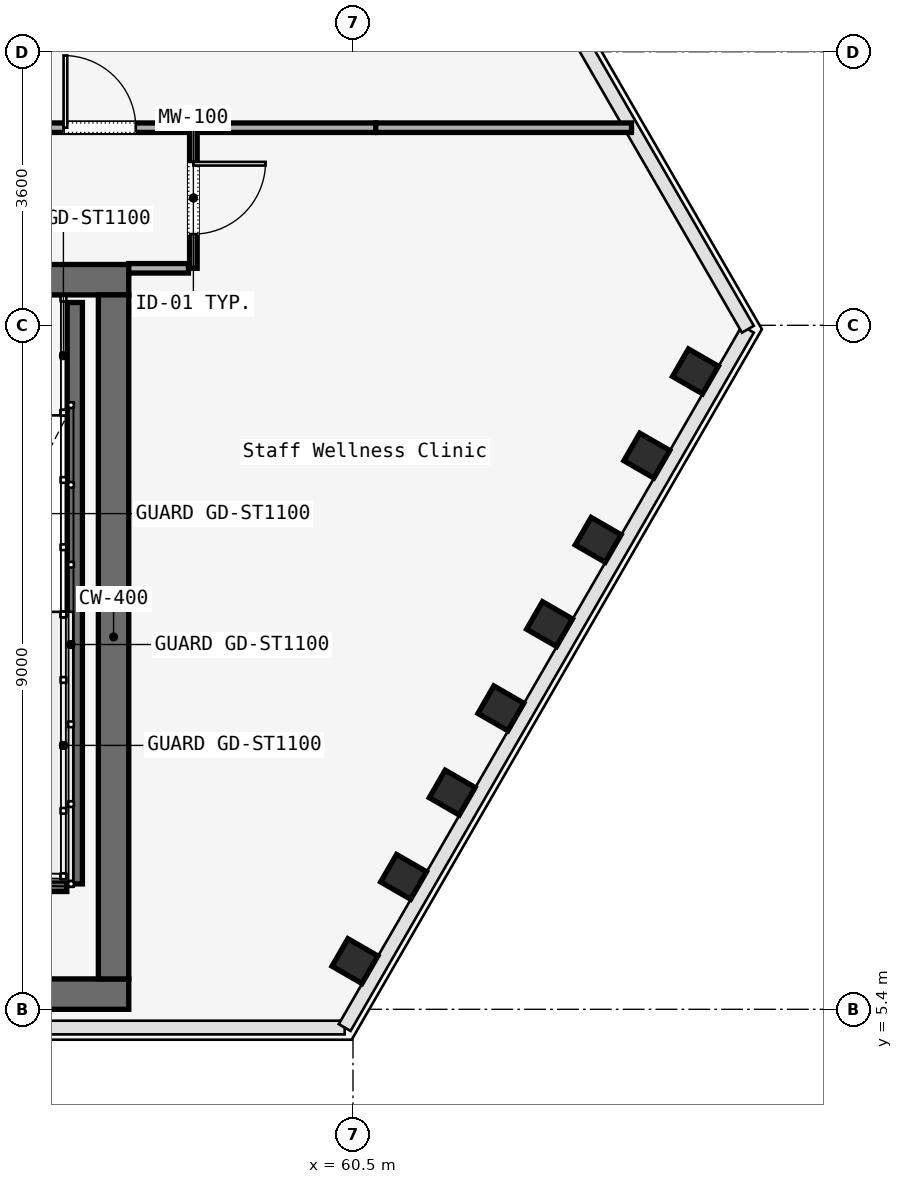
"""IFC4 building model, lengths in metres.
Left out: names, types, materials, properties, quantities, classifications, styles, units other than length and angle.
Written with IfcOpenShell. Run it as: python <this file> out.ifc"""

import sys

from ifc_helpers import new_model, si_unit, direction, frame, frame_2d, origin, origin_2d, place, context, subcontext, project, spatial, rectangle, i_section, extrude, element, fill, save


model = new_model("IFC4")
c1 = context("Model", 3, precision=1e-05, world=origin(), true_north=direction((0.0, 1.0)))
c2 = subcontext(c1, "Body", "Model", "MODEL_VIEW")
j1 = project(units=[si_unit("LENGTHUNIT", "METRE"), si_unit("PLANEANGLEUNIT", "RADIAN")], contexts=[c1])
p1 = place(None, origin())
s1 = spatial("IfcSite", under=j1, at=p1, CompositionType="ELEMENT")
p2 = place(p1, origin())
s2 = spatial("IfcBuilding", under=s1, at=p2, CompositionType="ELEMENT")
p3 = place(p2, frame((0.0, 0.0, 161.2)))
s3 = spatial("IfcBuildingStorey", under=s2, at=p3, CompositionType="ELEMENT", Elevation=161.2)
p4 = place(p3, frame((26.45, 15.0, 0.0), z_axis=(0.0, 0.0, 1.0), x_axis=(1.0, 0.0, 0.0)))
e1 = element("IfcWall", 1, at=p4, inside=s3, PredefinedType="SOLIDWALL", context=c2, shape_type="SweptSolid", body=[
    extrude(rectangle(XDim=31.1, YDim=0.4, at=frame_2d((15.55, 0.0))), origin(), (0.0, 0.0, 1.0), 3.58),
])
p5 = place(p4, frame((1.65, 0.0, 0.0)))
e2 = element("IfcOpeningElement", 2, at=p5, cuts=e1, PredefinedType="OPENING", context=c2, shape_type="SweptSolid", body=[
    extrude(rectangle(XDim=1.1, YDim=2.2, at=frame_2d((0.55, 1.1))), frame((0.0, 0.2, 0.0), z_axis=(0.0, -1.0, 0.0), x_axis=(1.0, 0.0, 0.0)), (0.0, 0.0, 1.0), 0.4),
])
p6 = place(p4, frame((13.65, 0.0, 0.0)))
e3 = element("IfcOpeningElement", 3, at=p6, cuts=e1, PredefinedType="OPENING", context=c2, shape_type="SweptSolid", body=[
    extrude(rectangle(XDim=1.1, YDim=2.2, at=frame_2d((0.55, 1.1))), frame((0.0, 0.2, 0.0), z_axis=(0.0, -1.0, 0.0), x_axis=(1.0, 0.0, 0.0)), (0.0, 0.0, 1.0), 0.4),
])
p7 = place(p4, frame((25.55, 0.0, 0.0)))
e4 = element("IfcOpeningElement", 4, at=p7, cuts=e1, PredefinedType="OPENING", context=c2, shape_type="SweptSolid", body=[
    extrude(rectangle(XDim=1.1, YDim=2.2, at=frame_2d((0.55, 1.1))), frame((0.0, 0.2, 0.0), z_axis=(0.0, -1.0, 0.0), x_axis=(1.0, 0.0, 0.0)), (0.0, 0.0, 1.0), 0.4),
])
p8 = place(p4, frame((10.7, 0.0, 0.0)))
e5 = element("IfcOpeningElement", 5, at=p8, cuts=e1, PredefinedType="OPENING", context=c2, shape_type="SweptSolid", body=[
    extrude(rectangle(XDim=1.4, YDim=2.2, at=frame_2d((0.7, 1.1))), frame((0.0, 0.2, 0.0), z_axis=(0.0, -1.0, 0.0), x_axis=(1.0, 0.0, 0.0)), (0.0, 0.0, 1.0), 0.4),
])
p9 = place(p4, frame((19.35, 0.0, 0.0)))
e6 = element("IfcOpeningElement", 6, at=p9, cuts=e1, PredefinedType="OPENING", context=c2, shape_type="SweptSolid", body=[
    extrude(rectangle(XDim=1.1, YDim=2.2, at=frame_2d((0.55, 1.1))), frame((0.0, 0.2, 0.0), z_axis=(0.0, -1.0, 0.0), x_axis=(1.0, 0.0, 0.0)), (0.0, 0.0, 1.0), 0.4),
])
p10 = place(p4, frame((21.4, 0.0, 0.0)))
e7 = element("IfcOpeningElement", 7, at=p10, cuts=e1, PredefinedType="OPENING", context=c2, shape_type="SweptSolid", body=[
    extrude(rectangle(XDim=0.9, YDim=2.1, at=frame_2d((0.45, 1.05))), frame((0.0, 0.2, 0.0), z_axis=(0.0, -1.0, 0.0), x_axis=(1.0, 0.0, 0.0)), (0.0, 0.0, 1.0), 0.4),
])
p11 = place(p4, frame((23.35, 0.0, 0.0)))
e8 = element("IfcOpeningElement", 8, at=p11, cuts=e1, PredefinedType="OPENING", context=c2, shape_type="SweptSolid", body=[
    extrude(rectangle(XDim=1.3, YDim=2.3, at=frame_2d((0.65, 1.15))), frame((0.0, 0.2, 0.0), z_axis=(0.0, -1.0, 0.0), x_axis=(1.0, 0.0, 0.0)), (0.0, 0.0, 1.0), 0.4),
])
p12 = place(p3, frame((26.45, 5.6, 0.0), z_axis=(0.0, 0.0, 1.0), x_axis=(1.0, 0.0, 0.0)))
e9 = element("IfcWall", 9, at=p12, inside=s3, PredefinedType="SOLIDWALL", context=c2, shape_type="SweptSolid", body=[
    extrude(rectangle(XDim=31.1, YDim=0.4, at=frame_2d((15.55, 0.0))), origin(), (0.0, 0.0, 1.0), 3.58),
])
p13 = place(p3, frame((57.35, 5.8, 0.0), z_axis=(0.0, 0.0, 1.0), x_axis=(0.0, 1.0, 0.0)))
e10 = element("IfcWall", 10, at=p13, inside=s3, PredefinedType="SOLIDWALL", context=c2, shape_type="SweptSolid", body=[
    extrude(rectangle(XDim=9.0, YDim=0.4, at=frame_2d((4.5, 0.0))), origin(), (0.0, 0.0, 1.0), 3.58),
])
for number, where, z_axis, x_axis in (
    (11, (60.526, 6.034, 0.0), (0.0, 0.0, 1.0), (0.5, 0.866, 0.0)),
    (12, (61.166, 7.143, 0.0), (0.0, 0.0, 1.0), (0.5, 0.866, 0.0)),
    (13, (61.806, 8.251, 0.0), (0.0, 0.0, 1.0), (0.5, 0.866, 0.0)),
    (14, (62.446, 9.36, 0.0), (0.0, 0.0, 1.0), (0.5, 0.866, 0.0)),
    (15, (63.086, 10.469, 0.0), (0.0, 0.0, 1.0), (0.5, 0.866, 0.0)),
    (16, (63.726, 11.577, 0.0), (0.0, 0.0, 1.0), (0.5, 0.866, 0.0)),
    (17, (64.366, 12.686, 0.0), (0.0, 0.0, 1.0), (0.5, 0.866, 0.0)),
    (18, (65.006, 13.794, 0.0), (0.0, 0.0, 1.0), (0.5, 0.866, 0.0)),
):
    element("IfcColumn", number, at=place(p3, frame(where, z_axis=z_axis, x_axis=x_axis)), inside=s3, PredefinedType="COLUMN", context=c2, shape_type="SweptSolid", body=[
        extrude(i_section(OverallWidth=0.418, OverallDepth=0.455, WebThickness=0.042, FlangeThickness=0.052, FilletRadius=0.015, at=origin_2d()), origin(), (0.0, 0.0, 1.0), 3.58),
    ])
p14 = place(p3, frame((56.84, 14.7, 0.0), z_axis=(0.0, 0.0, 1.0), x_axis=(0.0, -1.0, 0.0)))
e19 = element("IfcWall", 19, at=p14, inside=s3, PredefinedType="SOLIDWALL", context=c2, shape_type="SweptSolid", body=[
    extrude(rectangle(XDim=7.65, YDim=0.2, at=frame_2d((3.825, 0.0))), origin(), (0.0, 0.0, 1.0), 3.8),
])
p15 = place(p3, frame((53.62, 7.05, 0.0), z_axis=(0.0, 0.0, 1.0), x_axis=(1.0, 0.0, 0.0)))
e20 = element("IfcWall", 20, at=p15, inside=s3, PredefinedType="SOLIDWALL", context=c2, shape_type="SweptSolid", body=[
    extrude(rectangle(XDim=3.115, YDim=0.2, at=frame_2d((1.558, 0.0))), origin(), (0.0, 0.0, 1.0), 3.8),
])
p16 = place(p3, frame((58.4, 17.0, 0.0), z_axis=(0.0, 0.0, 1.0), x_axis=(0.0, -1.0, 0.0)))
e21 = element("IfcWall", 21, at=p16, inside=s3, PredefinedType="MOVABLE", context=c2, shape_type="SweptSolid", body=[
    extrude(rectangle(XDim=1.85, YDim=0.1, at=frame_2d((0.925, 0.0))), origin(), (0.0, 0.0, 1.0), 3.01),
])
p17 = place(p16, frame((0.45, 0.0, 0.0)))
e22 = element("IfcOpeningElement", 22, at=p17, cuts=e21, PredefinedType="OPENING", context=c2, shape_type="SweptSolid", body=[
    extrude(rectangle(XDim=0.95, YDim=2.2, at=frame_2d((0.475, 1.1))), frame((0.0, 0.05, 0.0), z_axis=(0.0, -1.0, 0.0), x_axis=(1.0, 0.0, 0.0)), (0.0, 0.0, 1.0), 0.1),
])
p18 = place(p3, frame((58.335, 15.15, 0.0), z_axis=(0.0, 0.0, 1.0), x_axis=(-1.0, 0.0, 0.0)))
e23 = element("IfcWall", 23, at=p18, inside=s3, PredefinedType="PARTITIONING", context=c2, shape_type="SweptSolid", body=[
    extrude(rectangle(XDim=0.785, YDim=0.125, at=frame_2d((0.393, 0.0))), origin(), (0.0, 0.0, 1.0), 3.01),
])
p19 = place(p3, frame((56.0, 17.0, 0.0), z_axis=(0.0, 0.0, 1.0), x_axis=(1.0, 0.0, 0.0)))
e24 = element("IfcWall", 24, at=p19, inside=s3, PredefinedType="PARTITIONING", context=c2, shape_type="SweptSolid", body=[
    extrude(rectangle(XDim=2.335, YDim=0.125, at=frame_2d((1.167, 0.0))), origin(), (0.0, 0.0, 1.0), 3.01),
])
p20 = place(p19, frame((0.692, 0.0, 0.0)))
e25 = element("IfcOpeningElement", 25, at=p20, cuts=e24, PredefinedType="OPENING", context=c2, shape_type="SweptSolid", body=[
    extrude(rectangle(XDim=0.95, YDim=2.2, at=frame_2d((0.475, 1.1))), frame((0.0, 0.062, 0.0), z_axis=(0.0, -1.0, 0.0), x_axis=(1.0, 0.0, 0.0)), (0.0, 0.0, 1.0), 0.125),
])
p21 = place(p3, frame((58.465, 17.0, 0.0), z_axis=(0.0, 0.0, 1.0), x_axis=(1.0, 0.0, 0.0)))
e26 = element("IfcWall", 26, at=p21, inside=s3, PredefinedType="PARTITIONING", context=c2, shape_type="SweptSolid", body=[
    extrude(rectangle(XDim=2.335, YDim=0.125, at=frame_2d((1.167, 0.0))), origin(), (0.0, 0.0, 1.0), 3.01),
])
p22 = place(p3, frame((60.8, 17.0, 0.0), z_axis=(0.0, 0.0, 1.0), x_axis=(1.0, 0.0, 0.0)))
e27 = element("IfcWall", 27, at=p22, inside=s3, PredefinedType="PARTITIONING", context=c2, shape_type="SweptSolid", body=[
    extrude(rectangle(XDim=3.365, YDim=0.125, at=frame_2d((1.682, 0.0))), origin(), (0.0, 0.0, 1.0), 3.01),
])
p23 = place(p17, origin())
e28 = element("IfcDoor", 28, at=p23, inside=s3, OperationType="SINGLE_SWING_RIGHT", PredefinedType="DOOR", context=c2, shape_type="SweptSolid", body=[
    extrude(rectangle(XDim=0.95, YDim=2.2, at=frame_2d((0.475, 1.1))), frame((0.0, 0.025, 0.0), z_axis=(0.0, -1.0, 0.0), x_axis=(1.0, 0.0, 0.0)), (0.0, 0.0, 1.0), 0.05),
])
fill(e22, e28)
p24 = place(p20, origin())
e29 = element("IfcDoor", 29, at=p24, inside=s3, OperationType="SINGLE_SWING_LEFT", PredefinedType="DOOR", context=c2, shape_type="SweptSolid", body=[
    extrude(rectangle(XDim=0.95, YDim=2.2, at=frame_2d((0.475, 1.1))), frame((0.0, 0.025, 0.0), z_axis=(0.0, -1.0, 0.0), x_axis=(1.0, 0.0, 0.0)), (0.0, 0.0, 1.0), 0.05),
])
fill(e25, e29)
save(model, sys.argv[1])
